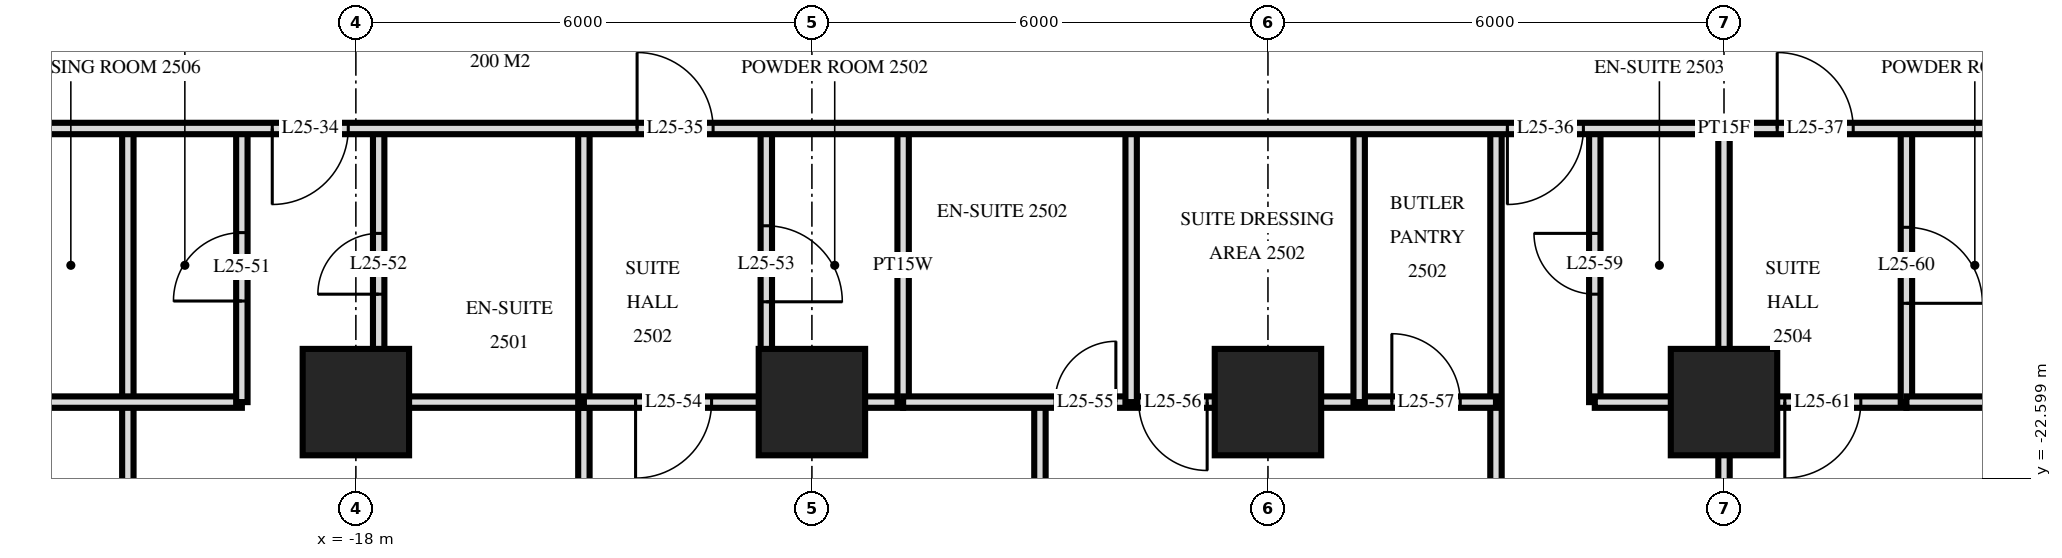
"""IFC4 building model, lengths in metres.
Left out: names, types, materials, properties, quantities, classifications, styles, units other than length and angle.
Written with IfcOpenShell. Run it as: python <this file> out.ifc"""

import sys

from ifc_helpers import new_model, si_unit, direction, frame, frame_2d, origin, origin_2d, place, context, subcontext, project, spatial, rectangle, extrude, element, fill, save


model = new_model("IFC4")
c1 = context("Model", 3, precision=1e-05, world=origin(), true_north=direction((0.0, 1.0)))
c2 = subcontext(c1, "Body", "Model", "MODEL_VIEW")
j1 = project(units=[si_unit("LENGTHUNIT", "METRE"), si_unit("PLANEANGLEUNIT", "RADIAN")], contexts=[c1])
p1 = place(None, origin())
s1 = spatial("IfcSite", under=j1, at=p1, CompositionType="ELEMENT")
p2 = place(p1, origin())
s2 = spatial("IfcBuilding", under=s1, at=p2, CompositionType="ELEMENT")
p3 = place(p2, frame((0.0, 0.0, 99.6)))
s3 = spatial("IfcBuildingStorey", under=s2, at=p3, CompositionType="ELEMENT", Elevation=99.6)
for number, where, z_axis, x_axis in (
    (1, (-18.0, -21.6, 0.0), (0.0, 0.0, 1.0), (1.0, 0.0, 0.0)),
    (2, (-12.0, -21.6, 0.0), (0.0, 0.0, 1.0), (1.0, 0.0, 0.0)),
    (3, (-6.0, -21.6, 0.0), (0.0, 0.0, 1.0), (1.0, 0.0, 0.0)),
    (4, (0.0, -21.6, 0.0), (0.0, 0.0, 1.0), (1.0, 0.0, 0.0)),
):
    element("IfcColumn", number, at=place(p3, frame(where, z_axis=z_axis, x_axis=x_axis)), inside=s3, PredefinedType="COLUMN", context=c2, shape_type="SweptSolid", body=[
        extrude(rectangle(XDim=1.4, YDim=1.4, at=origin_2d()), origin(), (0.0, 0.0, 1.0), 3.6),
    ])
p4 = place(p3, frame((2.4, -21.6, 0.0), z_axis=(0.0, 0.0, 1.0), x_axis=(0.0, 1.0, 0.0)))
e5 = element("IfcWall", 5, at=p4, inside=s3, PredefinedType="PARTITIONING", context=c2, shape_type="SweptSolid", body=[
    extrude(rectangle(XDim=3.6, YDim=0.15, at=frame_2d((1.8, 0.0))), origin(), (0.0, 0.0, 1.0), 3.32),
])
p5 = place(p4, frame((1.3, 0.0, 0.0)))
e6 = element("IfcOpeningElement", 6, at=p5, cuts=e5, PredefinedType="OPENING", context=c2, shape_type="SweptSolid", body=[
    extrude(rectangle(XDim=1.0, YDim=2.1, at=frame_2d((0.5, 1.05))), frame((0.0, 0.085, 0.0), z_axis=(0.0, -1.0, 0.0), x_axis=(1.0, 0.0, 0.0)), (0.0, 0.0, 1.0), 0.17),
])
p6 = place(p3, frame((0.0, -21.6, 0.0), z_axis=(0.0, 0.0, 1.0), x_axis=(0.0, 1.0, 0.0)))
e7 = element("IfcWall", 7, at=p6, inside=s3, PredefinedType="PARTITIONING", context=c2, shape_type="SweptSolid", body=[
    extrude(rectangle(XDim=3.6, YDim=0.15, at=frame_2d((1.8, 0.0))), origin(), (0.0, 0.0, 1.0), 3.32),
])
p7 = place(p3, frame((0.0, -29.22, 0.0), z_axis=(0.0, 0.0, 1.0), x_axis=(0.0, 1.0, 0.0)))
e8 = element("IfcWall", 8, at=p7, inside=s3, PredefinedType="PARTITIONING", context=c2, shape_type="SweptSolid", body=[
    extrude(rectangle(XDim=7.62, YDim=0.15, at=frame_2d((3.81, 0.0))), origin(), (0.0, 0.0, 1.0), 3.32),
])
p8 = place(p3, frame((-1.7, -21.6, 0.0), z_axis=(0.0, 0.0, 1.0), x_axis=(0.0, 1.0, 0.0)))
e9 = element("IfcWall", 9, at=p8, inside=s3, PredefinedType="PARTITIONING", context=c2, shape_type="SweptSolid", body=[
    extrude(rectangle(XDim=3.6, YDim=0.15, at=frame_2d((1.8, 0.0))), origin(), (0.0, 0.0, 1.0), 3.32),
])
p9 = place(p8, frame((1.42, 0.0, 0.0)))
e10 = element("IfcOpeningElement", 10, at=p9, cuts=e9, PredefinedType="OPENING", context=c2, shape_type="SweptSolid", body=[
    extrude(rectangle(XDim=0.8, YDim=2.1, at=frame_2d((0.4, 1.05))), frame((0.0, 0.085, 0.0), z_axis=(0.0, -1.0, 0.0), x_axis=(1.0, 0.0, 0.0)), (0.0, 0.0, 1.0), 0.17),
])
p10 = place(p3, frame((-3.0, -29.22, 0.0), z_axis=(0.0, 0.0, 1.0), x_axis=(0.0, 1.0, 0.0)))
e11 = element("IfcWall", 11, at=p10, inside=s3, PredefinedType="PARTITIONING", context=c2, shape_type="SweptSolid", body=[
    extrude(rectangle(XDim=11.22, YDim=0.15, at=frame_2d((5.61, 0.0))), origin(), (0.0, 0.0, 1.0), 3.32),
])
for number, where, z_axis, x_axis in (
    (12, (-4.8, -21.6, 0.0), (0.0, 0.0, 1.0), (0.0, 1.0, 0.0)),
    (13, (-7.8, -21.6, 0.0), (0.0, 0.0, 1.0), (0.0, 1.0, 0.0)),
):
    element("IfcWall", number, at=place(p3, frame(where, z_axis=z_axis, x_axis=x_axis)), inside=s3, PredefinedType="PARTITIONING", context=c2, shape_type="SweptSolid", body=[
        extrude(rectangle(XDim=3.6, YDim=0.15, at=frame_2d((1.8, 0.0))), origin(), (0.0, 0.0, 1.0), 3.32),
    ])
p11 = place(p3, frame((-9.0, -29.22, 0.0), z_axis=(0.0, 0.0, 1.0), x_axis=(0.0, 1.0, 0.0)))
e14 = element("IfcWall", 14, at=p11, inside=s3, PredefinedType="PARTITIONING", context=c2, shape_type="SweptSolid", body=[
    extrude(rectangle(XDim=7.62, YDim=0.15, at=frame_2d((3.81, 0.0))), origin(), (0.0, 0.0, 1.0), 3.32),
])
p12 = place(p11, frame((3.27, 0.0, 0.0)))
e15 = element("IfcOpeningElement", 15, at=p12, cuts=e14, PredefinedType="OPENING", context=c2, shape_type="SweptSolid", body=[
    extrude(rectangle(XDim=0.9, YDim=2.1, at=frame_2d((0.45, 1.05))), frame((0.0, 0.085, 0.0), z_axis=(0.0, -1.0, 0.0), x_axis=(1.0, 0.0, 0.0)), (0.0, 0.0, 1.0), 0.17),
])
p13 = place(p3, frame((-10.8, -21.6, 0.0), z_axis=(0.0, 0.0, 1.0), x_axis=(0.0, 1.0, 0.0)))
e16 = element("IfcWall", 16, at=p13, inside=s3, PredefinedType="PLUMBINGWALL", context=c2, shape_type="SweptSolid", body=[
    extrude(rectangle(XDim=3.6, YDim=0.15, at=frame_2d((1.8, 0.0))), origin(), (0.0, 0.0, 1.0), 3.32),
])
p14 = place(p3, frame((-12.6, -21.6, 0.0), z_axis=(0.0, 0.0, 1.0), x_axis=(0.0, 1.0, 0.0)))
e17 = element("IfcWall", 17, at=p14, inside=s3, PredefinedType="PARTITIONING", context=c2, shape_type="SweptSolid", body=[
    extrude(rectangle(XDim=3.6, YDim=0.15, at=frame_2d((1.8, 0.0))), origin(), (0.0, 0.0, 1.0), 3.32),
])
p15 = place(p14, frame((1.32, 0.0, 0.0)))
e18 = element("IfcOpeningElement", 18, at=p15, cuts=e17, PredefinedType="OPENING", context=c2, shape_type="SweptSolid", body=[
    extrude(rectangle(XDim=1.0, YDim=2.1, at=frame_2d((0.5, 1.05))), frame((0.0, 0.085, 0.0), z_axis=(0.0, -1.0, 0.0), x_axis=(1.0, 0.0, 0.0)), (0.0, 0.0, 1.0), 0.17),
])
p16 = place(p3, frame((-15.0, -21.6, 0.0), z_axis=(0.0, 0.0, 1.0), x_axis=(0.0, 1.0, 0.0)))
e19 = element("IfcWall", 19, at=p16, inside=s3, PredefinedType="PARTITIONING", context=c2, shape_type="SweptSolid", body=[
    extrude(rectangle(XDim=3.6, YDim=0.15, at=frame_2d((1.8, 0.0))), origin(), (0.0, 0.0, 1.0), 3.32),
])
p17 = place(p3, frame((-15.0, -29.22, 0.0), z_axis=(0.0, 0.0, 1.0), x_axis=(0.0, 1.0, 0.0)))
e20 = element("IfcWall", 20, at=p17, inside=s3, PredefinedType="PARTITIONING", context=c2, shape_type="SweptSolid", body=[
    extrude(rectangle(XDim=7.62, YDim=0.15, at=frame_2d((3.81, 0.0))), origin(), (0.0, 0.0, 1.0), 3.32),
])
p18 = place(p3, frame((-17.7, -21.6, 0.0), z_axis=(0.0, 0.0, 1.0), x_axis=(0.0, 1.0, 0.0)))
e21 = element("IfcWall", 21, at=p18, inside=s3, PredefinedType="PARTITIONING", context=c2, shape_type="SweptSolid", body=[
    extrude(rectangle(XDim=3.6, YDim=0.15, at=frame_2d((1.8, 0.0))), origin(), (0.0, 0.0, 1.0), 3.32),
])
p19 = place(p18, frame((1.42, 0.0, 0.0)))
e22 = element("IfcOpeningElement", 22, at=p19, cuts=e21, PredefinedType="OPENING", context=c2, shape_type="SweptSolid", body=[
    extrude(rectangle(XDim=0.8, YDim=2.1, at=frame_2d((0.4, 1.05))), frame((0.0, 0.085, 0.0), z_axis=(0.0, -1.0, 0.0), x_axis=(1.0, 0.0, 0.0)), (0.0, 0.0, 1.0), 0.17),
])
p20 = place(p3, frame((-19.5, -21.6, 0.0), z_axis=(0.0, 0.0, 1.0), x_axis=(0.0, 1.0, 0.0)))
e23 = element("IfcWall", 23, at=p20, inside=s3, PredefinedType="PARTITIONING", context=c2, shape_type="SweptSolid", body=[
    extrude(rectangle(XDim=3.6, YDim=0.15, at=frame_2d((1.8, 0.0))), origin(), (0.0, 0.0, 1.0), 3.32),
])
p21 = place(p20, frame((1.33, 0.0, 0.0)))
e24 = element("IfcOpeningElement", 24, at=p21, cuts=e23, PredefinedType="OPENING", context=c2, shape_type="SweptSolid", body=[
    extrude(rectangle(XDim=0.9, YDim=2.1, at=frame_2d((0.45, 1.05))), frame((0.0, 0.085, 0.0), z_axis=(0.0, -1.0, 0.0), x_axis=(1.0, 0.0, 0.0)), (0.0, 0.0, 1.0), 0.17),
])
p22 = place(p3, frame((-21.0, -29.22, 0.0), z_axis=(0.0, 0.0, 1.0), x_axis=(0.0, 1.0, 0.0)))
e25 = element("IfcWall", 25, at=p22, inside=s3, PredefinedType="PARTITIONING", context=c2, shape_type="SweptSolid", body=[
    extrude(rectangle(XDim=11.22, YDim=0.15, at=frame_2d((5.61, 0.0))), origin(), (0.0, 0.0, 1.0), 3.32),
])
p23 = place(p3, frame((-15.0, -21.6, 0.0), z_axis=(0.0, 0.0, 1.0), x_axis=(1.0, 0.0, 0.0)))
e26 = element("IfcWall", 26, at=p23, inside=s3, PredefinedType="PARTITIONING", context=c2, shape_type="SweptSolid", body=[
    extrude(rectangle(XDim=2.4, YDim=0.15, at=frame_2d((1.2, 0.0))), origin(), (0.0, 0.0, 1.0), 3.32),
])
p24 = place(p23, frame((0.68, 0.0, 0.0)))
e27 = element("IfcOpeningElement", 27, at=p24, cuts=e26, PredefinedType="OPENING", context=c2, shape_type="SweptSolid", body=[
    extrude(rectangle(XDim=1.0, YDim=2.1, at=frame_2d((0.5, 1.05))), frame((0.0, 0.085, 0.0), z_axis=(0.0, -1.0, 0.0), x_axis=(1.0, 0.0, 0.0)), (0.0, 0.0, 1.0), 0.17),
])
p25 = place(p3, frame((0.0, -21.6, 0.0), z_axis=(0.0, 0.0, 1.0), x_axis=(1.0, 0.0, 0.0)))
e28 = element("IfcWall", 28, at=p25, inside=s3, PredefinedType="PARTITIONING", context=c2, shape_type="SweptSolid", body=[
    extrude(rectangle(XDim=2.4, YDim=0.15, at=frame_2d((1.2, 0.0))), origin(), (0.0, 0.0, 1.0), 3.32),
])
p26 = place(p25, frame((0.8, 0.0, 0.0)))
e29 = element("IfcOpeningElement", 29, at=p26, cuts=e28, PredefinedType="OPENING", context=c2, shape_type="SweptSolid", body=[
    extrude(rectangle(XDim=1.0, YDim=2.1, at=frame_2d((0.5, 1.05))), frame((0.0, 0.085, 0.0), z_axis=(0.0, -1.0, 0.0), x_axis=(1.0, 0.0, 0.0)), (0.0, 0.0, 1.0), 0.17),
])
p27 = place(p3, frame((-22.5, -21.6, 0.0), z_axis=(0.0, 0.0, 1.0), x_axis=(1.0, 0.0, 0.0)))
e30 = element("IfcWall", 30, at=p27, inside=s3, PredefinedType="PARTITIONING", context=c2, shape_type="SweptSolid", body=[
    extrude(rectangle(XDim=3.0, YDim=0.15, at=frame_2d((1.5, 0.0))), origin(), (0.0, 0.0, 1.0), 3.32),
])
p28 = place(p3, frame((-17.7, -21.6, 0.0), z_axis=(0.0, 0.0, 1.0), x_axis=(1.0, 0.0, 0.0)))
e31 = element("IfcWall", 31, at=p28, inside=s3, PredefinedType="PARTITIONING", context=c2, shape_type="SweptSolid", body=[
    extrude(rectangle(XDim=2.7, YDim=0.15, at=frame_2d((1.35, 0.0))), origin(), (0.0, 0.0, 1.0), 3.32),
])
p29 = place(p3, frame((-10.8, -21.6, 0.0), z_axis=(0.0, 0.0, 1.0), x_axis=(1.0, 0.0, 0.0)))
e32 = element("IfcWall", 32, at=p29, inside=s3, PredefinedType="PARTITIONING", context=c2, shape_type="SweptSolid", body=[
    extrude(rectangle(XDim=7.8, YDim=0.15, at=frame_2d((3.9, 0.0))), origin(), (0.0, 0.0, 1.0), 3.32),
])
p30 = place(p29, frame((1.999, 0.0, 0.0)))
e33 = element("IfcOpeningElement", 33, at=p30, cuts=e32, PredefinedType="OPENING", context=c2, shape_type="SweptSolid", body=[
    extrude(rectangle(XDim=0.8, YDim=2.1, at=frame_2d((0.4, 1.05))), frame((0.0, 0.085, 0.0), z_axis=(0.0, -1.0, 0.0), x_axis=(1.0, 0.0, 0.0)), (0.0, 0.0, 1.0), 0.17),
])
p31 = place(p29, frame((3.1, 0.0, 0.0)))
e34 = element("IfcOpeningElement", 34, at=p31, cuts=e32, PredefinedType="OPENING", context=c2, shape_type="SweptSolid", body=[
    extrude(rectangle(XDim=0.9, YDim=2.1, at=frame_2d((0.45, 1.05))), frame((0.0, 0.085, 0.0), z_axis=(0.0, -1.0, 0.0), x_axis=(1.0, 0.0, 0.0)), (0.0, 0.0, 1.0), 0.17),
])
p32 = place(p29, frame((6.43, 0.0, 0.0)))
e35 = element("IfcOpeningElement", 35, at=p32, cuts=e32, PredefinedType="OPENING", context=c2, shape_type="SweptSolid", body=[
    extrude(rectangle(XDim=0.9, YDim=2.1, at=frame_2d((0.45, 1.05))), frame((0.0, 0.085, 0.0), z_axis=(0.0, -1.0, 0.0), x_axis=(1.0, 0.0, 0.0)), (0.0, 0.0, 1.0), 0.17),
])
p33 = place(p3, frame((-1.7, -21.6, 0.0), z_axis=(0.0, 0.0, 1.0), x_axis=(1.0, 0.0, 0.0)))
e36 = element("IfcWall", 36, at=p33, inside=s3, PredefinedType="PARTITIONING", context=c2, shape_type="SweptSolid", body=[
    extrude(rectangle(XDim=1.7, YDim=0.15, at=frame_2d((0.85, 0.0))), origin(), (0.0, 0.0, 1.0), 3.32),
])
for number, where, z_axis, x_axis in (
    (37, (-12.6, -21.6, 0.0), (0.0, 0.0, 1.0), (1.0, 0.0, 0.0)),
    (38, (2.4, -21.6, 0.0), (0.0, 0.0, 1.0), (1.0, 0.0, 0.0)),
):
    element("IfcWall", number, at=place(p3, frame(where, z_axis=z_axis, x_axis=x_axis)), inside=s3, PredefinedType="PLUMBINGWALL", context=c2, shape_type="SweptSolid", body=[
        extrude(rectangle(XDim=1.8, YDim=0.15, at=frame_2d((0.9, 0.0))), origin(), (0.0, 0.0, 1.0), 3.32),
    ])
p34 = place(p3, frame((-33.12, -18.0, 0.0), z_axis=(0.0, 0.0, 1.0), x_axis=(1.0, 0.0, 0.0)))
e39 = element("IfcWall", 39, at=p34, inside=s3, PredefinedType="PARTITIONING", context=c2, shape_type="SweptSolid", body=[
    extrude(rectangle(XDim=66.24, YDim=0.15, at=frame_2d((33.12, 0.0))), origin(), (0.0, 0.0, 1.0), 3.32),
])
p35 = place(p34, frame((14.02, 0.0, 0.0)))
e40 = element("IfcOpeningElement", 40, at=p35, cuts=e39, PredefinedType="OPENING", context=c2, shape_type="SweptSolid", body=[
    extrude(rectangle(XDim=1.0, YDim=2.1, at=frame_2d((0.5, 1.05))), frame((0.0, 0.085, 0.0), z_axis=(0.0, -1.0, 0.0), x_axis=(1.0, 0.0, 0.0)), (0.0, 0.0, 1.0), 0.17),
])
p36 = place(p34, frame((18.82, 0.0, 0.0)))
e41 = element("IfcOpeningElement", 41, at=p36, cuts=e39, PredefinedType="OPENING", context=c2, shape_type="SweptSolid", body=[
    extrude(rectangle(XDim=1.0, YDim=2.1, at=frame_2d((0.5, 1.05))), frame((0.0, 0.085, 0.0), z_axis=(0.0, -1.0, 0.0), x_axis=(1.0, 0.0, 0.0)), (0.0, 0.0, 1.0), 0.17),
])
p37 = place(p34, frame((30.27, 0.0, 0.0)))
e42 = element("IfcOpeningElement", 42, at=p37, cuts=e39, PredefinedType="OPENING", context=c2, shape_type="SweptSolid", body=[
    extrude(rectangle(XDim=1.0, YDim=2.1, at=frame_2d((0.5, 1.05))), frame((0.0, 0.085, 0.0), z_axis=(0.0, -1.0, 0.0), x_axis=(1.0, 0.0, 0.0)), (0.0, 0.0, 1.0), 0.17),
])
p38 = place(p34, frame((33.82, 0.0, 0.0)))
e43 = element("IfcOpeningElement", 43, at=p38, cuts=e39, PredefinedType="OPENING", context=c2, shape_type="SweptSolid", body=[
    extrude(rectangle(XDim=1.0, YDim=2.1, at=frame_2d((0.5, 1.05))), frame((0.0, 0.085, 0.0), z_axis=(0.0, -1.0, 0.0), x_axis=(1.0, 0.0, 0.0)), (0.0, 0.0, 1.0), 0.17),
])
p39 = place(p34, frame((46.27, 0.0, 0.0)))
e44 = element("IfcOpeningElement", 44, at=p39, cuts=e39, PredefinedType="OPENING", context=c2, shape_type="SweptSolid", body=[
    extrude(rectangle(XDim=1.0, YDim=2.1, at=frame_2d((0.5, 1.05))), frame((0.0, 0.085, 0.0), z_axis=(0.0, -1.0, 0.0), x_axis=(1.0, 0.0, 0.0)), (0.0, 0.0, 1.0), 0.17),
])
p40 = place(p34, frame((6.07, 0.0, 0.0)))
e45 = element("IfcOpeningElement", 45, at=p40, cuts=e39, PredefinedType="OPENING", context=c2, shape_type="SweptSolid", body=[
    extrude(rectangle(XDim=1.0, YDim=2.1, at=frame_2d((0.5, 1.05))), frame((0.0, 0.085, 0.0), z_axis=(0.0, -1.0, 0.0), x_axis=(1.0, 0.0, 0.0)), (0.0, 0.0, 1.0), 0.17),
])
p41 = place(p34, frame((60.37, 0.0, 0.0)))
e46 = element("IfcOpeningElement", 46, at=p41, cuts=e39, PredefinedType="OPENING", context=c2, shape_type="SweptSolid", body=[
    extrude(rectangle(XDim=1.0, YDim=2.1, at=frame_2d((0.5, 1.05))), frame((0.0, 0.085, 0.0), z_axis=(0.0, -1.0, 0.0), x_axis=(1.0, 0.0, 0.0)), (0.0, 0.0, 1.0), 0.17),
])
p42 = place(p35, frame((0.5, 0.0, 0.0), z_axis=(0.0, 0.0, 1.0), x_axis=(-1.0, 0.0, 0.0)))
e47 = element("IfcDoor", 47, at=p42, inside=s3, OperationType="SINGLE_SWING_LEFT", PredefinedType="DOOR", context=c2, shape_type="SweptSolid", body=[
    extrude(rectangle(XDim=1.0, YDim=2.1, at=frame_2d((0.0, 1.05))), frame((0.0, -0.025, 0.0), z_axis=(0.0, 1.0, 0.0), x_axis=(-1.0, 0.0, 0.0)), (0.0, 0.0, 1.0), 0.05),
])
fill(e40, e47)
p43 = place(p36, origin())
e48 = element("IfcDoor", 48, at=p43, inside=s3, OperationType="SINGLE_SWING_RIGHT", PredefinedType="DOOR", context=c2, shape_type="SweptSolid", body=[
    extrude(rectangle(XDim=1.0, YDim=2.1, at=frame_2d((0.5, 1.05))), frame((0.0, 0.025, 0.0), z_axis=(0.0, -1.0, 0.0), x_axis=(1.0, 0.0, 0.0)), (0.0, 0.0, 1.0), 0.05),
])
fill(e41, e48)
p44 = place(p37, frame((0.5, 0.0, 0.0), z_axis=(0.0, 0.0, 1.0), x_axis=(-1.0, 0.0, 0.0)))
e49 = element("IfcDoor", 49, at=p44, inside=s3, OperationType="SINGLE_SWING_LEFT", PredefinedType="DOOR", context=c2, shape_type="SweptSolid", body=[
    extrude(rectangle(XDim=1.0, YDim=2.1, at=frame_2d((0.0, 1.05))), frame((0.0, -0.025, 0.0), z_axis=(0.0, 1.0, 0.0), x_axis=(-1.0, 0.0, 0.0)), (0.0, 0.0, 1.0), 0.05),
])
fill(e42, e49)
p45 = place(p38, origin())
e50 = element("IfcDoor", 50, at=p45, inside=s3, OperationType="SINGLE_SWING_RIGHT", PredefinedType="DOOR", context=c2, shape_type="SweptSolid", body=[
    extrude(rectangle(XDim=1.0, YDim=2.1, at=frame_2d((0.5, 1.05))), frame((0.0, 0.025, 0.0), z_axis=(0.0, -1.0, 0.0), x_axis=(1.0, 0.0, 0.0)), (0.0, 0.0, 1.0), 0.05),
])
fill(e43, e50)
p46 = place(p21, origin())
e51 = element("IfcDoor", 51, at=p46, inside=s3, OperationType="SINGLE_SWING_RIGHT", PredefinedType="DOOR", context=c2, shape_type="SweptSolid", body=[
    extrude(rectangle(XDim=0.9, YDim=2.1, at=frame_2d((0.45, 1.05))), frame((0.0, 0.025, 0.0), z_axis=(0.0, -1.0, 0.0), x_axis=(1.0, 0.0, 0.0)), (0.0, 0.0, 1.0), 0.05),
])
fill(e24, e51)
p47 = place(p19, origin())
e52 = element("IfcDoor", 52, at=p47, inside=s3, OperationType="SINGLE_SWING_RIGHT", PredefinedType="DOOR", context=c2, shape_type="SweptSolid", body=[
    extrude(rectangle(XDim=0.8, YDim=2.1, at=frame_2d((0.4, 1.05))), frame((0.0, 0.025, 0.0), z_axis=(0.0, -1.0, 0.0), x_axis=(1.0, 0.0, 0.0)), (0.0, 0.0, 1.0), 0.05),
])
fill(e22, e52)
p48 = place(p15, frame((0.5, 0.0, 0.0), z_axis=(0.0, 0.0, 1.0), x_axis=(-1.0, 0.0, 0.0)))
e53 = element("IfcDoor", 53, at=p48, inside=s3, OperationType="SINGLE_SWING_LEFT", PredefinedType="DOOR", context=c2, shape_type="SweptSolid", body=[
    extrude(rectangle(XDim=1.0, YDim=2.1, at=frame_2d((0.0, 1.05))), frame((0.0, -0.025, 0.0), z_axis=(0.0, 1.0, 0.0), x_axis=(-1.0, 0.0, 0.0)), (0.0, 0.0, 1.0), 0.05),
])
fill(e18, e53)
p49 = place(p24, frame((0.5, 0.0, 0.0), z_axis=(0.0, 0.0, 1.0), x_axis=(-1.0, 0.0, 0.0)))
e54 = element("IfcDoor", 54, at=p49, inside=s3, OperationType="SINGLE_SWING_LEFT", PredefinedType="DOOR", context=c2, shape_type="SweptSolid", body=[
    extrude(rectangle(XDim=1.0, YDim=2.1, at=frame_2d((0.0, 1.05))), frame((0.0, -0.025, 0.0), z_axis=(0.0, 1.0, 0.0), x_axis=(-1.0, 0.0, 0.0)), (0.0, 0.0, 1.0), 0.05),
])
fill(e27, e54)
p50 = place(p30, origin())
e55 = element("IfcDoor", 55, at=p50, inside=s3, OperationType="SINGLE_SWING_LEFT", PredefinedType="DOOR", context=c2, shape_type="SweptSolid", body=[
    extrude(rectangle(XDim=0.8, YDim=2.1, at=frame_2d((0.4, 1.05))), frame((0.0, 0.025, 0.0), z_axis=(0.0, -1.0, 0.0), x_axis=(1.0, 0.0, 0.0)), (0.0, 0.0, 1.0), 0.05),
])
fill(e33, e55)
p51 = place(p31, frame((0.45, 0.0, 0.0), z_axis=(0.0, 0.0, 1.0), x_axis=(-1.0, 0.0, 0.0)))
e56 = element("IfcDoor", 56, at=p51, inside=s3, OperationType="SINGLE_SWING_RIGHT", PredefinedType="DOOR", context=c2, shape_type="SweptSolid", body=[
    extrude(rectangle(XDim=0.9, YDim=2.1, at=frame_2d((0.0, 1.05))), frame((0.0, -0.025, 0.0), z_axis=(0.0, 1.0, 0.0), x_axis=(-1.0, 0.0, 0.0)), (0.0, 0.0, 1.0), 0.05),
])
fill(e34, e56)
p52 = place(p32, origin())
e57 = element("IfcDoor", 57, at=p52, inside=s3, OperationType="SINGLE_SWING_RIGHT", PredefinedType="DOOR", context=c2, shape_type="SweptSolid", body=[
    extrude(rectangle(XDim=0.9, YDim=2.1, at=frame_2d((0.45, 1.05))), frame((0.0, 0.025, 0.0), z_axis=(0.0, -1.0, 0.0), x_axis=(1.0, 0.0, 0.0)), (0.0, 0.0, 1.0), 0.05),
])
fill(e35, e57)
p53 = place(p9, origin())
e58 = element("IfcDoor", 58, at=p53, inside=s3, OperationType="SINGLE_SWING_LEFT", PredefinedType="DOOR", context=c2, shape_type="SweptSolid", body=[
    extrude(rectangle(XDim=0.8, YDim=2.1, at=frame_2d((0.4, 1.05))), frame((0.0, 0.025, 0.0), z_axis=(0.0, -1.0, 0.0), x_axis=(1.0, 0.0, 0.0)), (0.0, 0.0, 1.0), 0.05),
])
fill(e10, e58)
p54 = place(p5, frame((0.5, 0.0, 0.0), z_axis=(0.0, 0.0, 1.0), x_axis=(-1.0, 0.0, 0.0)))
e59 = element("IfcDoor", 59, at=p54, inside=s3, OperationType="SINGLE_SWING_LEFT", PredefinedType="DOOR", context=c2, shape_type="SweptSolid", body=[
    extrude(rectangle(XDim=1.0, YDim=2.1, at=frame_2d((0.0, 1.05))), frame((0.0, -0.025, 0.0), z_axis=(0.0, 1.0, 0.0), x_axis=(-1.0, 0.0, 0.0)), (0.0, 0.0, 1.0), 0.05),
])
fill(e6, e59)
p55 = place(p26, frame((0.5, 0.0, 0.0), z_axis=(0.0, 0.0, 1.0), x_axis=(-1.0, 0.0, 0.0)))
e60 = element("IfcDoor", 60, at=p55, inside=s3, OperationType="SINGLE_SWING_LEFT", PredefinedType="DOOR", context=c2, shape_type="SweptSolid", body=[
    extrude(rectangle(XDim=1.0, YDim=2.1, at=frame_2d((0.0, 1.05))), frame((0.0, -0.025, 0.0), z_axis=(0.0, 1.0, 0.0), x_axis=(-1.0, 0.0, 0.0)), (0.0, 0.0, 1.0), 0.05),
])
fill(e29, e60)
save(model, sys.argv[1])
